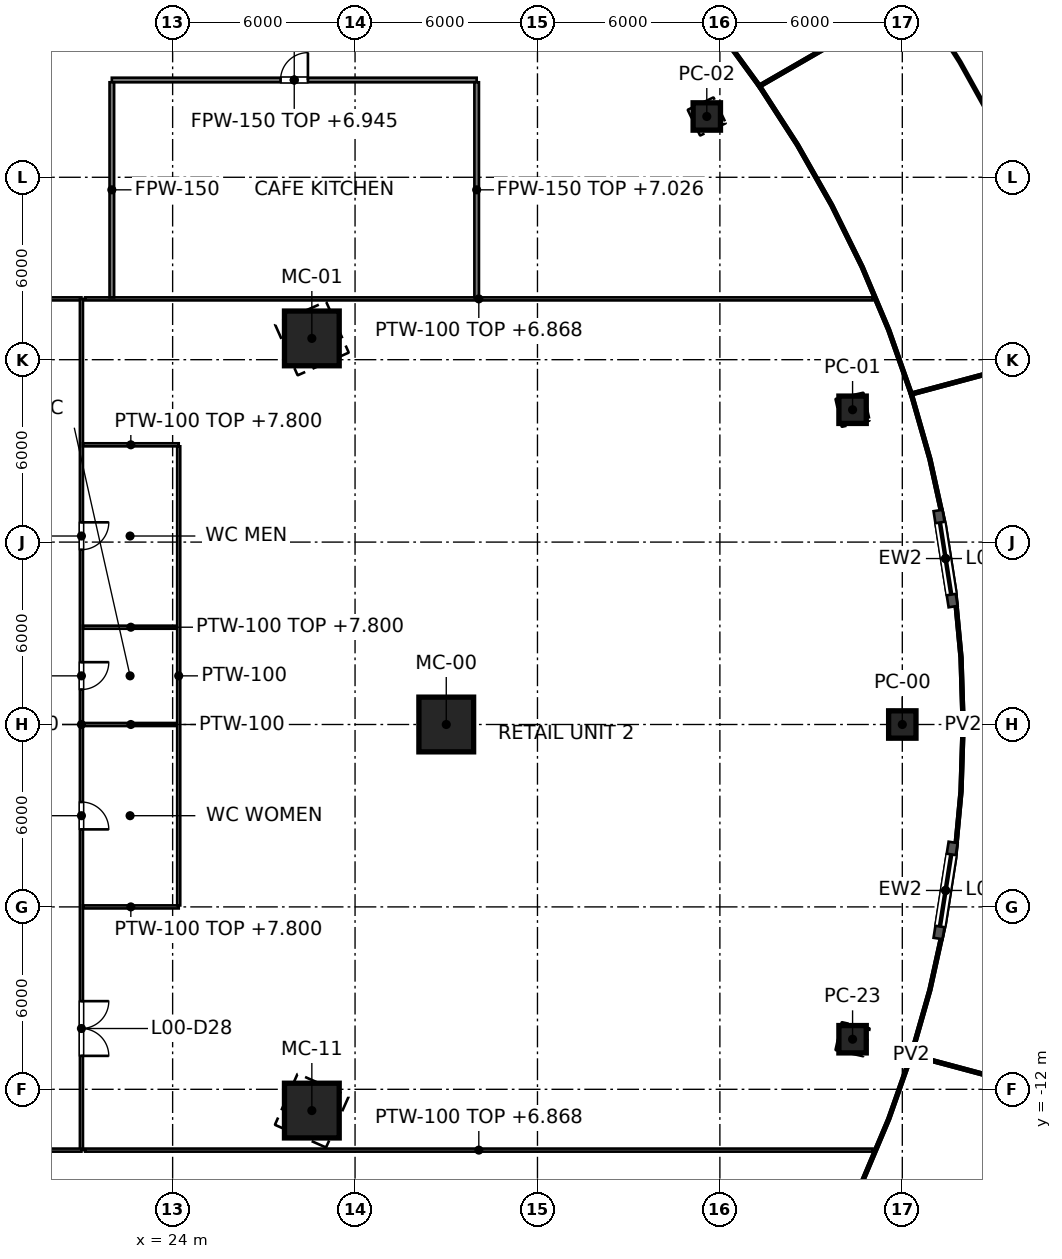
"""IFC4 building model, lengths in metres.
Left out: names, types, materials, properties, quantities, classifications, styles, units other than length and angle.
Written with IfcOpenShell. Run it as: python <this file> out.ifc"""

import sys

from ifc_helpers import new_model, si_unit, direction, frame, frame_2d, origin, origin_2d, place, context, subcontext, project, spatial, rectangle, hollow_rectangle, extrude, element, fill, save


model = new_model("IFC4")
c1 = context("Model", 3, precision=1e-05, world=origin(), true_north=direction((0.0, 1.0)))
c2 = subcontext(c1, "Body", "Model", "MODEL_VIEW")
j1 = project(units=[si_unit("LENGTHUNIT", "METRE"), si_unit("PLANEANGLEUNIT", "RADIAN")], contexts=[c1])
p1 = place(None, origin())
s1 = spatial("IfcSite", under=j1, at=p1, CompositionType="ELEMENT")
p2 = place(p1, origin())
s2 = spatial("IfcBuilding", under=s1, at=p2, CompositionType="ELEMENT")
p3 = place(p2, origin())
s3 = spatial("IfcBuildingStorey", under=s2, at=p3, CompositionType="ELEMENT", Elevation=0.0)
for number, where, z_axis, x_axis in (
    (1, (33.0, 0.0, 0.0), (0.0, 0.0, 1.0), (1.0, 0.0, 0.0)),
    (2, (28.579, 12.7, 0.0), (0.0, 0.0, 1.0), (0.914, 0.406, 0.0)),
    (3, (28.579, -12.7, 0.0), (0.0, 0.0, 1.0), (0.914, -0.406, 0.0)),
):
    element("IfcColumn", number, at=place(p3, frame(where, z_axis=z_axis, x_axis=x_axis)), inside=s3, PredefinedType="COLUMN", context=c2, shape_type="SweptSolid", body=[
        extrude(hollow_rectangle(XDim=1.8, YDim=1.8, WallThickness=0.08, at=origin_2d()), origin(), (0.0, 0.0, 1.0), 8.0),
    ])
for number, where, z_axis, x_axis in (
    (4, (48.0, 0.0, 0.0), (0.0, 0.0, 1.0), (1.0, 0.0, 0.0)),
    (5, (46.365, 10.353, 0.0), (0.0, 0.0, 1.0), (0.976, 0.218, 0.0)),
    (6, (41.569, 20.0, 0.0), (0.0, 0.0, 1.0), (0.901, 0.434, 0.0)),
    (7, (46.365, -10.353, 0.0), (0.0, 0.0, 1.0), (0.976, -0.218, 0.0)),
):
    element("IfcColumn", number, at=place(p3, frame(where, z_axis=z_axis, x_axis=x_axis)), inside=s3, PredefinedType="COLUMN", context=c2, shape_type="SweptSolid", body=[
        extrude(hollow_rectangle(XDim=0.9, YDim=0.9, WallThickness=0.04, at=origin_2d()), origin(), (0.0, 0.0, 1.0), 8.0),
    ])
p4 = place(p3, frame((49.672, 3.878, 0.0), z_axis=(0.0, 0.0, 1.0), x_axis=(-0.154877245759, 0.987933721839, 0.0)))
e8 = element("IfcWall", 8, at=p4, inside=s3, PredefinedType="SOLIDWALL", context=c2, shape_type="SweptSolid", body=[
    extrude(rectangle(XDim=3.2, YDim=0.3, at=frame_2d((1.6, 0.0))), origin(), (0.0, 0.0, 1.0), 7.8),
])
p5 = place(p4, frame((0.4, 0.0, 0.0)))
e9 = element("IfcOpeningElement", 9, at=p5, cuts=e8, PredefinedType="OPENING", context=c2, shape_type="SweptSolid", body=[
    extrude(rectangle(XDim=2.4, YDim=2.4, at=frame_2d((1.2, 1.2))), frame((0.0, 0.15, 0.0), z_axis=(0.0, -1.0, 0.0), x_axis=(1.0, 0.0, 0.0)), (0.0, 0.0, 1.0), 0.3),
])
p6 = place(p3, frame((49.176, -7.04, 0.0), z_axis=(0.0, 0.0, 1.0), x_axis=(0.154877245759, 0.987933721839, 0.0)))
e10 = element("IfcWall", 10, at=p6, inside=s3, PredefinedType="SOLIDWALL", context=c2, shape_type="SweptSolid", body=[
    extrude(rectangle(XDim=3.2, YDim=0.3, at=frame_2d((1.6, 0.0))), origin(), (0.0, 0.0, 1.0), 7.8),
])
p7 = place(p6, frame((0.4, 0.0, 0.0)))
e11 = element("IfcOpeningElement", 11, at=p7, cuts=e10, PredefinedType="OPENING", context=c2, shape_type="SweptSolid", body=[
    extrude(rectangle(XDim=2.4, YDim=2.4, at=frame_2d((1.2, 1.2))), frame((0.0, 0.15, 0.0), z_axis=(0.0, -1.0, 0.0), x_axis=(1.0, 0.0, 0.0)), (0.0, 0.0, 1.0), 0.3),
])
p8 = place(p3, frame((15.0, 14.0, 0.0), z_axis=(0.0, 0.0, 1.0), x_axis=(1.0, 0.0, 0.0)))
e12 = element("IfcWall", 12, at=p8, inside=s3, PredefinedType="PARTITIONING", context=c2, shape_type="SweptSolid", body=[
    extrude(rectangle(XDim=6.0, YDim=0.1, at=frame_2d((3.0, 0.0))), origin(), (0.0, 0.0, 1.0), 6.945),
])
p9 = place(p3, frame((21.0, 14.0, 0.0), z_axis=(0.0, 0.0, 1.0), x_axis=(0.0, -1.0, 0.0)))
e13 = element("IfcWall", 13, at=p9, inside=s3, PredefinedType="PARTITIONING", context=c2, shape_type="SweptSolid", body=[
    extrude(rectangle(XDim=28.0, YDim=0.1, at=frame_2d((14.0, 0.0))), origin(), (0.0, 0.0, 1.0), 6.877),
])
p10 = place(p9, frame((23.1, 0.0, 0.0)))
e14 = element("IfcOpeningElement", 14, at=p10, cuts=e13, PredefinedType="OPENING", context=c2, shape_type="SweptSolid", body=[
    extrude(rectangle(XDim=1.8, YDim=2.1, at=frame_2d((0.9, 1.05))), frame((0.0, 0.05, 0.0), z_axis=(0.0, -1.0, 0.0), x_axis=(1.0, 0.0, 0.0)), (0.0, 0.0, 1.0), 0.1),
])
p11 = place(p9, frame((16.55, 0.0, 0.0)))
e15 = element("IfcOpeningElement", 15, at=p11, cuts=e13, PredefinedType="OPENING", context=c2, shape_type="SweptSolid", body=[
    extrude(rectangle(XDim=0.9, YDim=2.1, at=frame_2d((0.45, 1.05))), frame((0.0, 0.05, 0.0), z_axis=(0.0, -1.0, 0.0), x_axis=(1.0, 0.0, 0.0)), (0.0, 0.0, 1.0), 0.1),
])
p12 = place(p9, frame((11.95, 0.0, 0.0)))
e16 = element("IfcOpeningElement", 16, at=p12, cuts=e13, PredefinedType="OPENING", context=c2, shape_type="SweptSolid", body=[
    extrude(rectangle(XDim=0.9, YDim=2.1, at=frame_2d((0.45, 1.05))), frame((0.0, 0.05, 0.0), z_axis=(0.0, -1.0, 0.0), x_axis=(1.0, 0.0, 0.0)), (0.0, 0.0, 1.0), 0.1),
])
p13 = place(p9, frame((7.35, 0.0, 0.0)))
e17 = element("IfcOpeningElement", 17, at=p13, cuts=e13, PredefinedType="OPENING", context=c2, shape_type="SweptSolid", body=[
    extrude(rectangle(XDim=0.9, YDim=2.1, at=frame_2d((0.45, 1.05))), frame((0.0, 0.05, 0.0), z_axis=(0.0, -1.0, 0.0), x_axis=(1.0, 0.0, 0.0)), (0.0, 0.0, 1.0), 0.1),
])
p14 = place(p3, frame((21.0, -14.0, 0.0), z_axis=(0.0, 0.0, 1.0), x_axis=(-1.0, 0.0, 0.0)))
e18 = element("IfcWall", 18, at=p14, inside=s3, PredefinedType="PARTITIONING", context=c2, shape_type="SweptSolid", body=[
    extrude(rectangle(XDim=6.0, YDim=0.1, at=frame_2d((3.0, 0.0))), origin(), (0.0, 0.0, 1.0), 6.945),
])
for number, where, z_axis, x_axis in (
    (19, (21.121, 14.0, 0.0), (0.0, 0.0, 1.0), (1.0, 0.0, 0.0)),
    (20, (21.121, -14.0, 0.0), (0.0, 0.0, 1.0), (1.0, 0.0, 0.0)),
):
    element("IfcWall", number, at=place(p3, frame(where, z_axis=z_axis, x_axis=x_axis)), inside=s3, PredefinedType="PARTITIONING", context=c2, shape_type="SweptSolid", body=[
        extrude(rectangle(XDim=25.9, YDim=0.1, at=frame_2d((12.95, 0.0))), origin(), (0.0, 0.0, 1.0), 6.868),
    ])
p15 = place(p3, frame((21.05, -6.0, 0.0), z_axis=(0.0, 0.0, 1.0), x_axis=(1.0, 0.0, 0.0)))
e21 = element("IfcWall", 21, at=p15, inside=s3, PredefinedType="PARTITIONING", context=c2, shape_type="SweptSolid", body=[
    extrude(rectangle(XDim=3.15, YDim=0.1, at=frame_2d((1.575, 0.0))), origin(), (0.0, 0.0, 1.0), 7.8),
])
p16 = place(p3, frame((21.05, 0.0, 0.0), z_axis=(0.0, 0.0, 1.0), x_axis=(1.0, 0.0, 0.0)))
e22 = element("IfcWall", 22, at=p16, inside=s3, PredefinedType="PARTITIONING", context=c2, shape_type="SweptSolid", body=[
    extrude(rectangle(XDim=3.15, YDim=0.1, at=frame_2d((1.575, 0.0))), origin(), (0.0, 0.0, 1.0), 6.877),
])
for number, where, z_axis, x_axis in (
    (23, (21.05, 3.2, 0.0), (0.0, 0.0, 1.0), (1.0, 0.0, 0.0)),
    (24, (21.05, 9.2, 0.0), (0.0, 0.0, 1.0), (1.0, 0.0, 0.0)),
):
    element("IfcWall", number, at=place(p3, frame(where, z_axis=z_axis, x_axis=x_axis)), inside=s3, PredefinedType="PARTITIONING", context=c2, shape_type="SweptSolid", body=[
        extrude(rectangle(XDim=3.15, YDim=0.1, at=frame_2d((1.575, 0.0))), origin(), (0.0, 0.0, 1.0), 7.8),
    ])
p17 = place(p3, frame((24.2, -5.95, 0.0), z_axis=(0.0, 0.0, 1.0), x_axis=(0.0, 1.0, 0.0)))
e25 = element("IfcWall", 25, at=p17, inside=s3, PredefinedType="PARTITIONING", context=c2, shape_type="SweptSolid", body=[
    extrude(rectangle(XDim=15.1, YDim=0.1, at=frame_2d((7.55, 0.0))), origin(), (0.0, 0.0, 1.0), 6.877),
])
p18 = place(p3, frame((22.0, 21.2, 0.0), z_axis=(0.0, 0.0, 1.0), x_axis=(1.0, 0.0, 0.0)))
e26 = element("IfcWall", 26, at=p18, inside=s3, PredefinedType="PARTITIONING", context=c2, shape_type="SweptSolid", body=[
    extrude(rectangle(XDim=12.0, YDim=0.15, at=frame_2d((6.0, 0.0))), origin(), (0.0, 0.0, 1.0), 6.945),
])
p19 = place(p18, frame((5.55, 0.0, 0.0)))
e27 = element("IfcOpeningElement", 27, at=p19, cuts=e26, PredefinedType="OPENING", context=c2, shape_type="SweptSolid", body=[
    extrude(rectangle(XDim=0.9, YDim=2.1, at=frame_2d((0.45, 1.05))), frame((0.0, 0.075, 0.0), z_axis=(0.0, -1.0, 0.0), x_axis=(1.0, 0.0, 0.0)), (0.0, 0.0, 1.0), 0.15),
])
p20 = place(p3, frame((22.0, 14.05, 0.0), z_axis=(0.0, 0.0, 1.0), x_axis=(0.0, 1.0, 0.0)))
e28 = element("IfcWall", 28, at=p20, inside=s3, PredefinedType="PARTITIONING", context=c2, shape_type="SweptSolid", body=[
    extrude(rectangle(XDim=7.075, YDim=0.15, at=frame_2d((3.538, 0.0))), origin(), (0.0, 0.0, 1.0), 6.868),
])
p21 = place(p3, frame((34.0, 14.05, 0.0), z_axis=(0.0, 0.0, 1.0), x_axis=(0.0, 1.0, 0.0)))
e29 = element("IfcWall", 29, at=p21, inside=s3, PredefinedType="PARTITIONING", context=c2, shape_type="SweptSolid", body=[
    extrude(rectangle(XDim=7.075, YDim=0.15, at=frame_2d((3.538, 0.0))), origin(), (0.0, 0.0, 1.0), 7.026),
])
p22 = place(p5, origin())
e30 = element("IfcDoor", 30, at=p22, inside=s3, OperationType="DOUBLE_DOOR_SLIDING", PredefinedType="DOOR", context=c2, shape_type="SweptSolid", body=[
    extrude(rectangle(XDim=2.4, YDim=2.4, at=frame_2d((1.2, 1.2))), frame((0.0, 0.025, 0.0), z_axis=(0.0, -1.0, 0.0), x_axis=(1.0, 0.0, 0.0)), (0.0, 0.0, 1.0), 0.05),
])
fill(e9, e30)
p23 = place(p7, origin())
e31 = element("IfcDoor", 31, at=p23, inside=s3, OperationType="DOUBLE_DOOR_SLIDING", PredefinedType="DOOR", context=c2, shape_type="SweptSolid", body=[
    extrude(rectangle(XDim=2.4, YDim=2.4, at=frame_2d((1.2, 1.2))), frame((0.0, 0.025, 0.0), z_axis=(0.0, -1.0, 0.0), x_axis=(1.0, 0.0, 0.0)), (0.0, 0.0, 1.0), 0.05),
])
fill(e11, e31)
p24 = place(p19, origin())
e32 = element("IfcDoor", 32, at=p24, inside=s3, OperationType="SINGLE_SWING_RIGHT", PredefinedType="DOOR", context=c2, shape_type="SweptSolid", body=[
    extrude(rectangle(XDim=0.9, YDim=2.1, at=frame_2d((0.45, 1.05))), frame((0.0, 0.025, 0.0), z_axis=(0.0, -1.0, 0.0), x_axis=(1.0, 0.0, 0.0)), (0.0, 0.0, 1.0), 0.05),
])
fill(e27, e32)
p25 = place(p10, origin())
e33 = element("IfcDoor", 33, at=p25, inside=s3, OperationType="DOUBLE_DOOR_SINGLE_SWING", PredefinedType="DOOR", context=c2, shape_type="SweptSolid", body=[
    extrude(rectangle(XDim=1.8, YDim=2.1, at=frame_2d((0.9, 1.05))), frame((0.0, 0.025, 0.0), z_axis=(0.0, -1.0, 0.0), x_axis=(1.0, 0.0, 0.0)), (0.0, 0.0, 1.0), 0.05),
])
fill(e14, e33)
p26 = place(p11, origin())
e34 = element("IfcDoor", 34, at=p26, inside=s3, OperationType="SINGLE_SWING_RIGHT", PredefinedType="DOOR", context=c2, shape_type="SweptSolid", body=[
    extrude(rectangle(XDim=0.9, YDim=2.1, at=frame_2d((0.45, 1.05))), frame((0.0, 0.025, 0.0), z_axis=(0.0, -1.0, 0.0), x_axis=(1.0, 0.0, 0.0)), (0.0, 0.0, 1.0), 0.05),
])
fill(e15, e34)
p27 = place(p12, origin())
e35 = element("IfcDoor", 35, at=p27, inside=s3, OperationType="SINGLE_SWING_LEFT", PredefinedType="DOOR", context=c2, shape_type="SweptSolid", body=[
    extrude(rectangle(XDim=0.9, YDim=2.1, at=frame_2d((0.45, 1.05))), frame((0.0, 0.025, 0.0), z_axis=(0.0, -1.0, 0.0), x_axis=(1.0, 0.0, 0.0)), (0.0, 0.0, 1.0), 0.05),
])
fill(e16, e35)
p28 = place(p13, origin())
e36 = element("IfcDoor", 36, at=p28, inside=s3, OperationType="SINGLE_SWING_LEFT", PredefinedType="DOOR", context=c2, shape_type="SweptSolid", body=[
    extrude(rectangle(XDim=0.9, YDim=2.1, at=frame_2d((0.45, 1.05))), frame((0.0, 0.025, 0.0), z_axis=(0.0, -1.0, 0.0), x_axis=(1.0, 0.0, 0.0)), (0.0, 0.0, 1.0), 0.05),
])
fill(e17, e36)
save(model, sys.argv[1])
